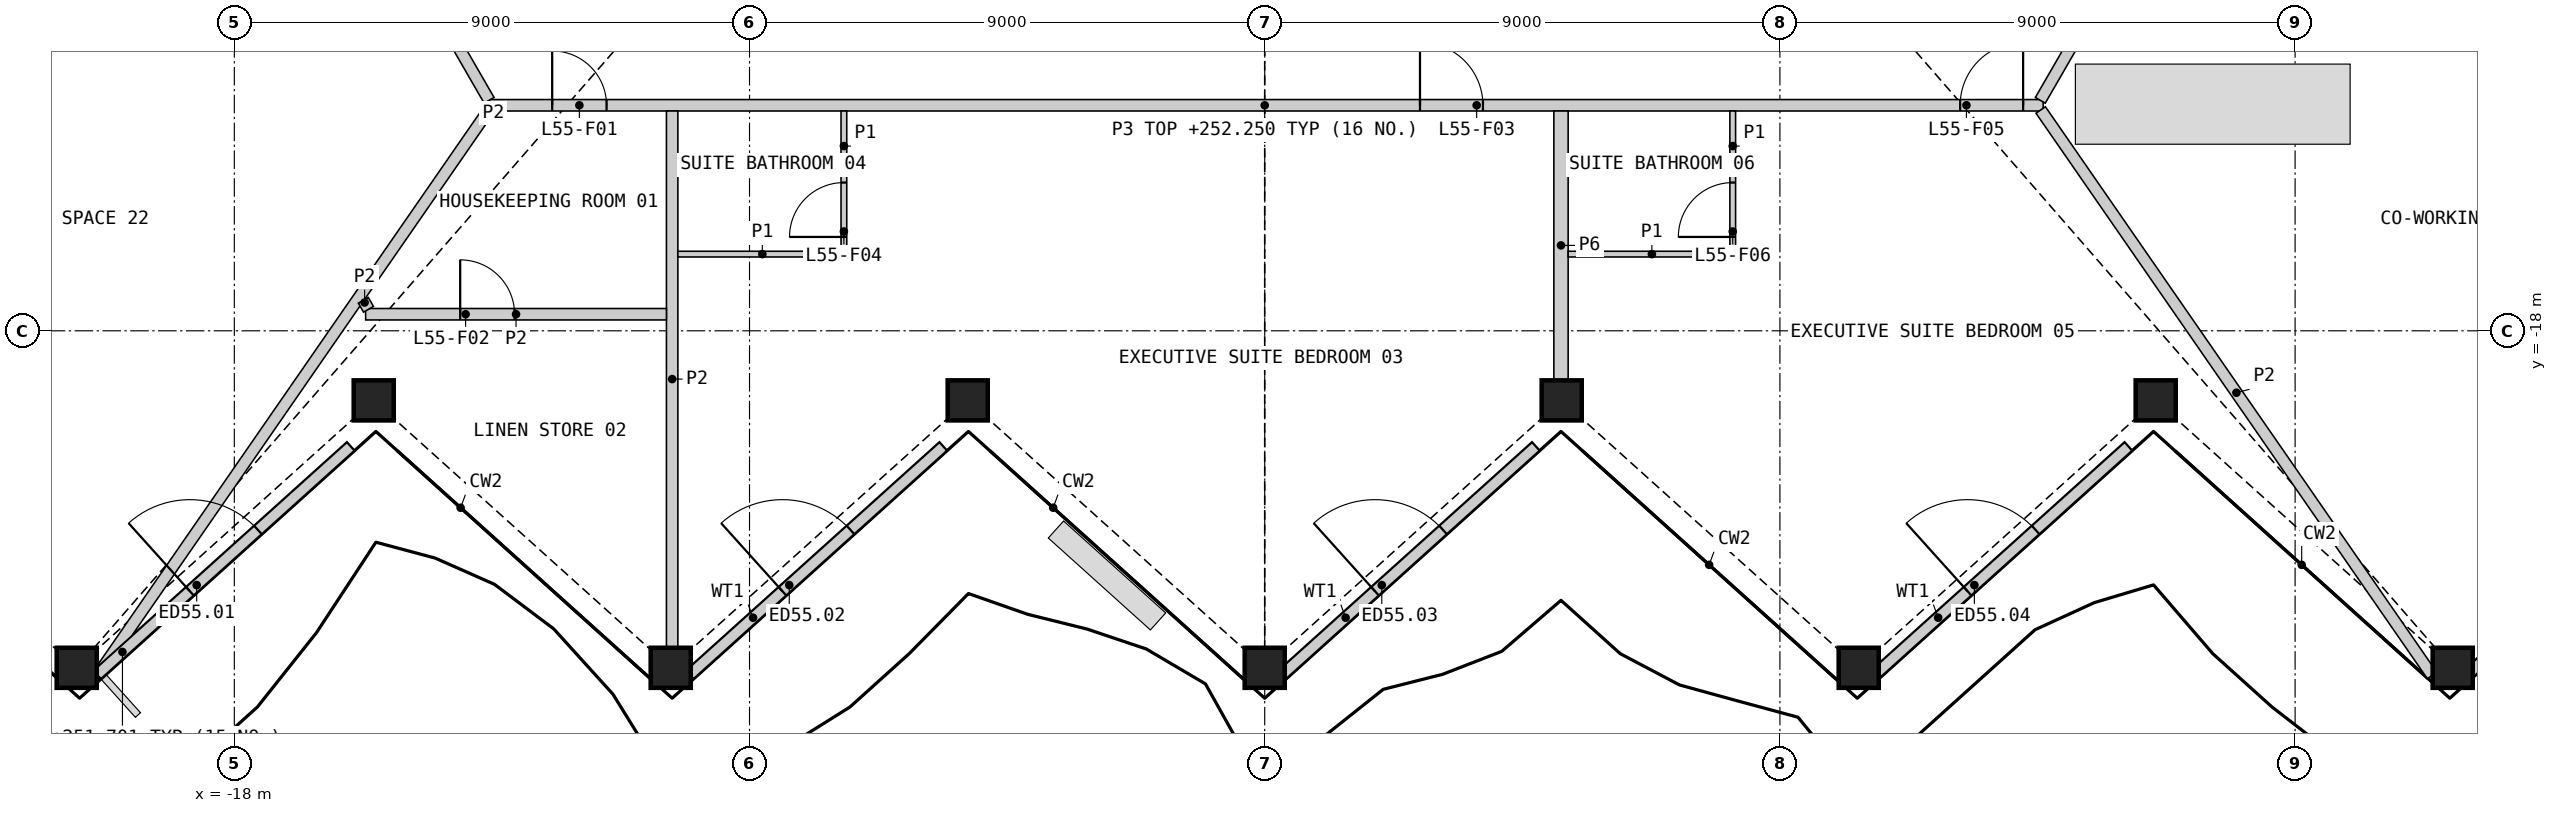
"""IFC4 building model, lengths in metres.
Left out: names, types, materials, properties, quantities, classifications, styles, units other than length and angle.
Written with IfcOpenShell. Run it as: python <this file> out.ifc"""

import sys

from ifc_helpers import new_model, si_unit, direction, frame, frame_2d, origin, origin_2d, place, context, subcontext, project, spatial, polyline, rectangle, hollow_rectangle, outline, extrude, element, fill, save


model = new_model("IFC4")
c1 = context("Model", 3, precision=1e-05, world=origin(), true_north=direction((0.0, 1.0)))
c2 = subcontext(c1, "Body", "Model", "MODEL_VIEW")
j1 = project(units=[si_unit("LENGTHUNIT", "METRE"), si_unit("PLANEANGLEUNIT", "RADIAN")], contexts=[c1])
p1 = place(None, origin())
s1 = spatial("IfcSite", under=j1, at=p1, CompositionType="ELEMENT")
p2 = place(p1, origin())
s2 = spatial("IfcBuilding", under=s1, at=p2, CompositionType="ELEMENT")
p3 = place(p2, frame((0.0, 0.0, 249.0)))
s3 = spatial("IfcBuildingStorey", under=s2, at=p3, CompositionType="ELEMENT", Elevation=249.0)
for number, where, z_axis, x_axis in (
    (1, (-20.753, -23.887, 0.0), (0.0, 0.0, 1.0), (1.0, 0.0, 0.0)),
    (2, (-15.565, -19.215, 0.0), (0.0, 0.0, 1.0), (1.0, 0.0, 0.0)),
    (3, (-10.376, -23.887, 0.0), (0.0, 0.0, 1.0), (1.0, 0.0, 0.0)),
    (4, (-5.188, -19.215, 0.0), (0.0, 0.0, 1.0), (1.0, 0.0, 0.0)),
    (5, (0.0, -23.887, 0.0), (0.0, 0.0, 1.0), (1.0, 0.0, 0.0)),
    (6, (5.188, -19.215, 0.0), (0.0, 0.0, 1.0), (1.0, 0.0, 0.0)),
    (7, (10.376, -23.887, 0.0), (0.0, 0.0, 1.0), (1.0, 0.0, 0.0)),
    (8, (15.565, -19.215, 0.0), (0.0, 0.0, 1.0), (1.0, 0.0, 0.0)),
    (9, (20.753, -23.887, 0.0), (0.0, 0.0, 1.0), (1.0, 0.0, 0.0)),
):
    element("IfcColumn", number, at=place(p3, frame(where, z_axis=z_axis, x_axis=x_axis)), inside=s3, PredefinedType="COLUMN", context=c2, shape_type="SweptSolid", body=[
        extrude(hollow_rectangle(XDim=0.7, YDim=0.7, WallThickness=0.045, at=origin_2d()), origin(), (0.0, 0.0, 1.0), 3.6),
    ])
p4 = place(p3, frame((-20.397, -24.009, 0.0), z_axis=(0.0, 0.0, 1.0), x_axis=(0.74315161366, 0.669123067241, 0.0)))
e10 = element("IfcWall", 10, at=p4, inside=s3, PredefinedType="SOLIDWALL", context=c2, shape_type="SweptSolid", body=[
    extrude(rectangle(XDim=5.963, YDim=0.2, at=frame_2d((2.981, 0.0))), origin(), (0.0, 0.0, 1.0), 2.701),
])
p5 = place(p4, frame((2.181, 0.0, 0.0)))
e11 = element("IfcOpeningElement", 11, at=p5, cuts=e10, PredefinedType="OPENING", context=c2, shape_type="SweptSolid", body=[
    extrude(rectangle(XDim=1.6, YDim=2.4, at=frame_2d((0.8, 1.2))), frame((0.0, 0.11, 0.0), z_axis=(0.0, -1.0, 0.0), x_axis=(1.0, 0.0, 0.0)), (0.0, 0.0, 1.0), 0.22),
])
p6 = place(p3, frame((-10.046, -24.009, 0.0), z_axis=(0.0, 0.0, 1.0), x_axis=(0.743133280699, 0.669143427912, 0.0)))
e12 = element("IfcWall", 12, at=p6, inside=s3, PredefinedType="SOLIDWALL", context=c2, shape_type="SweptSolid", body=[
    extrude(rectangle(XDim=5.962, YDim=0.2, at=frame_2d((2.981, 0.0))), origin(), (0.0, 0.0, 1.0), 2.701),
])
p7 = place(p6, frame((2.181, 0.0, 0.0)))
e13 = element("IfcOpeningElement", 13, at=p7, cuts=e12, PredefinedType="OPENING", context=c2, shape_type="SweptSolid", body=[
    extrude(rectangle(XDim=1.6, YDim=2.4, at=frame_2d((0.8, 1.2))), frame((0.0, 0.11, 0.0), z_axis=(0.0, -1.0, 0.0), x_axis=(1.0, 0.0, 0.0)), (0.0, 0.0, 1.0), 0.22),
])
p8 = place(p3, frame((0.305, -24.009, 0.0), z_axis=(0.0, 0.0, 1.0), x_axis=(0.74315161366, 0.669123067241, 0.0)))
e14 = element("IfcWall", 14, at=p8, inside=s3, PredefinedType="SOLIDWALL", context=c2, shape_type="SweptSolid", body=[
    extrude(rectangle(XDim=5.963, YDim=0.2, at=frame_2d((2.981, 0.0))), origin(), (0.0, 0.0, 1.0), 2.701),
])
p9 = place(p8, frame((2.181, 0.0, 0.0)))
e15 = element("IfcOpeningElement", 15, at=p9, cuts=e14, PredefinedType="OPENING", context=c2, shape_type="SweptSolid", body=[
    extrude(rectangle(XDim=1.6, YDim=2.4, at=frame_2d((0.8, 1.2))), frame((0.0, 0.11, 0.0), z_axis=(0.0, -1.0, 0.0), x_axis=(1.0, 0.0, 0.0)), (0.0, 0.0, 1.0), 0.22),
])
p10 = place(p3, frame((10.657, -24.009, 0.0), z_axis=(0.0, 0.0, 1.0), x_axis=(0.74315161366, 0.669123067241, 0.0)))
e16 = element("IfcWall", 16, at=p10, inside=s3, PredefinedType="SOLIDWALL", context=c2, shape_type="SweptSolid", body=[
    extrude(rectangle(XDim=5.963, YDim=0.2, at=frame_2d((2.981, 0.0))), origin(), (0.0, 0.0, 1.0), 2.701),
])
p11 = place(p10, frame((2.181, 0.0, 0.0)))
e17 = element("IfcOpeningElement", 17, at=p11, cuts=e16, PredefinedType="OPENING", context=c2, shape_type="SweptSolid", body=[
    extrude(rectangle(XDim=1.6, YDim=2.4, at=frame_2d((0.8, 1.2))), frame((0.0, 0.11, 0.0), z_axis=(0.0, -1.0, 0.0), x_axis=(1.0, 0.0, 0.0)), (0.0, 0.0, 1.0), 0.22),
])
p12 = place(p3, frame((21.008, -24.009, 0.0), z_axis=(0.0, 0.0, 1.0), x_axis=(0.743133280699, 0.669143427912, 0.0)))
e18 = element("IfcWall", 18, at=p12, inside=s3, PredefinedType="SOLIDWALL", context=c2, shape_type="SweptSolid", body=[
    extrude(rectangle(XDim=5.962, YDim=0.2, at=frame_2d((2.981, 0.0))), origin(), (0.0, 0.0, 1.0), 2.701),
])
p13 = place(p12, frame((2.181, 0.0, 0.0)))
e19 = element("IfcOpeningElement", 19, at=p13, cuts=e18, PredefinedType="OPENING", context=c2, shape_type="SweptSolid", body=[
    extrude(rectangle(XDim=1.6, YDim=2.4, at=frame_2d((0.8, 1.2))), frame((0.0, 0.11, 0.0), z_axis=(0.0, -1.0, 0.0), x_axis=(1.0, 0.0, 0.0)), (0.0, 0.0, 1.0), 0.22),
])
p14 = place(p3, frame((-13.599, -14.06, 0.0), z_axis=(0.0, 0.0, 1.0), x_axis=(1.0, 0.0, 0.0)))
e20 = element("IfcWall", 20, at=p14, inside=s3, PredefinedType="PARTITIONING", context=c2, shape_type="SweptSolid", body=[
    extrude(rectangle(XDim=27.198, YDim=0.2, at=frame_2d((13.599, 0.0))), origin(), (0.0, 0.0, 1.0), 3.25),
])
p15 = place(p14, frame((1.152, 0.0, 0.0)))
e21 = element("IfcOpeningElement", 21, at=p15, cuts=e20, PredefinedType="OPENING", context=c2, shape_type="SweptSolid", body=[
    extrude(rectangle(XDim=0.95, YDim=2.1, at=frame_2d((0.475, 1.05))), frame((0.0, 0.11, 0.0), z_axis=(0.0, -1.0, 0.0), x_axis=(1.0, 0.0, 0.0)), (0.0, 0.0, 1.0), 0.22),
])
p16 = place(p14, frame((16.311, 0.0, 0.0)))
e22 = element("IfcOpeningElement", 22, at=p16, cuts=e20, PredefinedType="OPENING", context=c2, shape_type="SweptSolid", body=[
    extrude(rectangle(XDim=1.1, YDim=2.1, at=frame_2d((0.55, 1.05))), frame((0.0, 0.11, 0.0), z_axis=(0.0, -1.0, 0.0), x_axis=(1.0, 0.0, 0.0)), (0.0, 0.0, 1.0), 0.22),
])
p17 = place(p14, frame((25.747, 0.0, 0.0)))
e23 = element("IfcOpeningElement", 23, at=p17, cuts=e20, PredefinedType="OPENING", context=c2, shape_type="SweptSolid", body=[
    extrude(rectangle(XDim=1.1, YDim=2.1, at=frame_2d((0.55, 1.05))), frame((0.0, 0.11, 0.0), z_axis=(0.0, -1.0, 0.0), x_axis=(1.0, 0.0, 0.0)), (0.0, 0.0, 1.0), 0.22),
])
p18 = place(p3, frame((5.176, -18.855, 0.0), z_axis=(0.0, 0.0, 1.0), x_axis=(0.0, 1.0, 0.0)))
e24 = element("IfcWall", 24, at=p18, inside=s3, PredefinedType="PARTITIONING", context=c2, shape_type="SweptSolid", body=[
    extrude(rectangle(XDim=4.695, YDim=0.25, at=frame_2d((2.348, 0.0))), origin(), (0.0, 0.0, 1.0), 2.404),
])
for number, where, z_axis, x_axis in (
    (25, (13.549, -13.974, 0.0), (0.0, 0.0, 1.0), (0.5, 0.866, 0.0)),
    (26, (-15.05, -11.374, 0.0), (0.0, 0.0, 1.0), (0.5, -0.866, 0.0)),
):
    element("IfcWall", number, at=place(p3, frame(where, z_axis=z_axis, x_axis=x_axis)), inside=s3, PredefinedType="PARTITIONING", context=c2, shape_type="SweptSolid", body=[
        extrude(rectangle(XDim=3.002, YDim=0.2, at=frame_2d((1.501, 0.0))), origin(), (0.0, 0.0, 1.0), 3.25),
    ])
p19 = place(p3, origin())
e27 = element("IfcWall", 27, at=p19, inside=s3, PredefinedType="PARTITIONING", context=c2, shape_type="SweptSolid", body=[
    extrude(outline(polyline([(-13.473, -14.199), (-19.794, -23.331), (-20.439, -23.912), (-13.638, -14.086), (-13.473, -14.199)])), origin(), (0.0, 0.0, 1.0), 2.404),
])
p20 = place(p3, frame((13.556, -14.143, 0.0), z_axis=(0.0, 0.0, 1.0), x_axis=(0.56913494803, -0.82224413098, 0.0)))
e28 = element("IfcWall", 28, at=p20, inside=s3, PredefinedType="PARTITIONING", context=c2, shape_type="SweptSolid", body=[
    extrude(rectangle(XDim=12.014, YDim=0.2, at=frame_2d((6.007, 0.0))), origin(), (0.0, 0.0, 1.0), 2.404),
])
p21 = place(p3, frame((-10.351, -23.527, 0.0), z_axis=(0.0, 0.0, 1.0), x_axis=(0.0, 1.0, 0.0)))
e29 = element("IfcWall", 29, at=p21, inside=s3, PredefinedType="PARTITIONING", context=c2, shape_type="SweptSolid", body=[
    extrude(rectangle(XDim=9.366, YDim=0.2, at=frame_2d((4.683, 0.0))), origin(), (0.0, 0.0, 1.0), 2.404),
])
p22 = place(p3, frame((-15.706, -17.71, 0.0), z_axis=(0.0, 0.0, 1.0), x_axis=(1.0, 0.0, 0.0)))
e30 = element("IfcWall", 30, at=p22, inside=s3, PredefinedType="PARTITIONING", context=c2, shape_type="SweptSolid", body=[
    extrude(rectangle(XDim=5.255, YDim=0.2, at=frame_2d((2.627, 0.0))), origin(), (0.0, 0.0, 1.0), 2.404),
])
p23 = place(p22, frame((1.652, 0.0, 0.0)))
e31 = element("IfcOpeningElement", 31, at=p23, cuts=e30, PredefinedType="OPENING", context=c2, shape_type="SweptSolid", body=[
    extrude(rectangle(XDim=0.95, YDim=2.1, at=frame_2d((0.475, 1.05))), frame((0.0, 0.11, 0.0), z_axis=(0.0, -1.0, 0.0), x_axis=(1.0, 0.0, 0.0)), (0.0, 0.0, 1.0), 0.22),
])
p24 = place(p3, frame((-15.747, -17.467, 0.0), z_axis=(0.0, 0.0, 1.0), x_axis=(0.498749683645, -0.866746071848, 0.0)))
e32 = element("IfcWall", 32, at=p24, inside=s3, PredefinedType="PARTITIONING", context=c2, shape_type="SweptSolid", body=[
    extrude(rectangle(XDim=0.181, YDim=0.2, at=frame_2d((0.091, 0.0))), origin(), (0.0, 0.0, 1.0), 2.404),
])
p25 = place(p3, frame((-10.251, -16.66, 0.0), z_axis=(0.0, 0.0, 1.0), x_axis=(1.0, 0.0, 0.0)))
e33 = element("IfcWall", 33, at=p25, inside=s3, PredefinedType="PARTITIONING", context=c2, shape_type="SweptSolid", body=[
    extrude(rectangle(XDim=2.95, YDim=0.1, at=frame_2d((1.475, 0.0))), origin(), (0.0, 0.0, 1.0), 2.404),
])
p26 = place(p3, frame((5.301, -16.66, 0.0), z_axis=(0.0, 0.0, 1.0), x_axis=(1.0, 0.0, 0.0)))
e34 = element("IfcWall", 34, at=p26, inside=s3, PredefinedType="PARTITIONING", context=c2, shape_type="SweptSolid", body=[
    extrude(rectangle(XDim=2.925, YDim=0.1, at=frame_2d((1.462, 0.0))), origin(), (0.0, 0.0, 1.0), 2.404),
])
p27 = place(p3, frame((-7.351, -16.61, 0.0), z_axis=(0.0, 0.0, 1.0), x_axis=(0.0, 1.0, 0.0)))
e35 = element("IfcWall", 35, at=p27, inside=s3, PredefinedType="PARTITIONING", context=c2, shape_type="SweptSolid", body=[
    extrude(rectangle(XDim=2.45, YDim=0.1, at=frame_2d((1.225, 0.0))), origin(), (0.0, 0.0, 1.0), 2.404),
])
p28 = place(p27, frame((0.25, 0.0, 0.0)))
e36 = element("IfcOpeningElement", 36, at=p28, cuts=e35, PredefinedType="OPENING", context=c2, shape_type="SweptSolid", body=[
    extrude(rectangle(XDim=0.95, YDim=2.1, at=frame_2d((0.475, 1.05))), frame((0.0, 0.06, 0.0), z_axis=(0.0, -1.0, 0.0), x_axis=(1.0, 0.0, 0.0)), (0.0, 0.0, 1.0), 0.12),
])
p29 = place(p3, frame((8.176, -16.61, 0.0), z_axis=(0.0, 0.0, 1.0), x_axis=(0.0, 1.0, 0.0)))
e37 = element("IfcWall", 37, at=p29, inside=s3, PredefinedType="PARTITIONING", context=c2, shape_type="SweptSolid", body=[
    extrude(rectangle(XDim=2.45, YDim=0.1, at=frame_2d((1.225, 0.0))), origin(), (0.0, 0.0, 1.0), 2.404),
])
p30 = place(p29, frame((0.25, 0.0, 0.0)))
e38 = element("IfcOpeningElement", 38, at=p30, cuts=e37, PredefinedType="OPENING", context=c2, shape_type="SweptSolid", body=[
    extrude(rectangle(XDim=0.95, YDim=2.1, at=frame_2d((0.475, 1.05))), frame((0.0, 0.06, 0.0), z_axis=(0.0, -1.0, 0.0), x_axis=(1.0, 0.0, 0.0)), (0.0, 0.0, 1.0), 0.12),
])
p31 = place(p5, origin())
e39 = element("IfcDoor", 39, at=p31, inside=s3, OperationType="DOUBLE_DOOR_SINGLE_SWING", PredefinedType="DOOR", context=c2, shape_type="SweptSolid", body=[
    extrude(rectangle(XDim=1.6, YDim=2.4, at=frame_2d((0.8, 1.2))), frame((0.0, 0.025, 0.0), z_axis=(0.0, -1.0, 0.0), x_axis=(1.0, 0.0, 0.0)), (0.0, 0.0, 1.0), 0.05),
])
fill(e11, e39)
p32 = place(p7, origin())
e40 = element("IfcDoor", 40, at=p32, inside=s3, OperationType="DOUBLE_DOOR_SINGLE_SWING", PredefinedType="DOOR", context=c2, shape_type="SweptSolid", body=[
    extrude(rectangle(XDim=1.6, YDim=2.4, at=frame_2d((0.8, 1.2))), frame((0.0, 0.025, 0.0), z_axis=(0.0, -1.0, 0.0), x_axis=(1.0, 0.0, 0.0)), (0.0, 0.0, 1.0), 0.05),
])
fill(e13, e40)
p33 = place(p9, origin())
e41 = element("IfcDoor", 41, at=p33, inside=s3, OperationType="DOUBLE_DOOR_SINGLE_SWING", PredefinedType="DOOR", context=c2, shape_type="SweptSolid", body=[
    extrude(rectangle(XDim=1.6, YDim=2.4, at=frame_2d((0.8, 1.2))), frame((0.0, 0.025, 0.0), z_axis=(0.0, -1.0, 0.0), x_axis=(1.0, 0.0, 0.0)), (0.0, 0.0, 1.0), 0.05),
])
fill(e15, e41)
p34 = place(p11, origin())
e42 = element("IfcDoor", 42, at=p34, inside=s3, OperationType="DOUBLE_DOOR_SINGLE_SWING", PredefinedType="DOOR", context=c2, shape_type="SweptSolid", body=[
    extrude(rectangle(XDim=1.6, YDim=2.4, at=frame_2d((0.8, 1.2))), frame((0.0, 0.025, 0.0), z_axis=(0.0, -1.0, 0.0), x_axis=(1.0, 0.0, 0.0)), (0.0, 0.0, 1.0), 0.05),
])
fill(e17, e42)
p35 = place(p15, origin())
e43 = element("IfcDoor", 43, at=p35, inside=s3, OperationType="SINGLE_SWING_LEFT", PredefinedType="DOOR", context=c2, shape_type="SweptSolid", body=[
    extrude(rectangle(XDim=0.95, YDim=2.1, at=frame_2d((0.475, 1.05))), frame((0.0, 0.025, 0.0), z_axis=(0.0, -1.0, 0.0), x_axis=(1.0, 0.0, 0.0)), (0.0, 0.0, 1.0), 0.05),
])
fill(e21, e43)
p36 = place(p23, origin())
e44 = element("IfcDoor", 44, at=p36, inside=s3, OperationType="SINGLE_SWING_LEFT", PredefinedType="DOOR", context=c2, shape_type="SweptSolid", body=[
    extrude(rectangle(XDim=0.95, YDim=2.1, at=frame_2d((0.475, 1.05))), frame((0.0, 0.025, 0.0), z_axis=(0.0, -1.0, 0.0), x_axis=(1.0, 0.0, 0.0)), (0.0, 0.0, 1.0), 0.05),
])
fill(e31, e44)
p37 = place(p16, origin())
e45 = element("IfcDoor", 45, at=p37, inside=s3, OperationType="SINGLE_SWING_LEFT", PredefinedType="DOOR", context=c2, shape_type="SweptSolid", body=[
    extrude(rectangle(XDim=1.1, YDim=2.1, at=frame_2d((0.55, 1.05))), frame((0.0, 0.025, 0.0), z_axis=(0.0, -1.0, 0.0), x_axis=(1.0, 0.0, 0.0)), (0.0, 0.0, 1.0), 0.05),
])
fill(e22, e45)
p38 = place(p28, origin())
e46 = element("IfcDoor", 46, at=p38, inside=s3, OperationType="SINGLE_SWING_LEFT", PredefinedType="DOOR", context=c2, shape_type="SweptSolid", body=[
    extrude(rectangle(XDim=0.95, YDim=2.1, at=frame_2d((0.475, 1.05))), frame((0.0, 0.025, 0.0), z_axis=(0.0, -1.0, 0.0), x_axis=(1.0, 0.0, 0.0)), (0.0, 0.0, 1.0), 0.05),
])
fill(e36, e46)
p39 = place(p17, origin())
e47 = element("IfcDoor", 47, at=p39, inside=s3, OperationType="SINGLE_SWING_RIGHT", PredefinedType="DOOR", context=c2, shape_type="SweptSolid", body=[
    extrude(rectangle(XDim=1.1, YDim=2.1, at=frame_2d((0.55, 1.05))), frame((0.0, 0.025, 0.0), z_axis=(0.0, -1.0, 0.0), x_axis=(1.0, 0.0, 0.0)), (0.0, 0.0, 1.0), 0.05),
])
fill(e23, e47)
p40 = place(p30, origin())
e48 = element("IfcDoor", 48, at=p40, inside=s3, OperationType="SINGLE_SWING_LEFT", PredefinedType="DOOR", context=c2, shape_type="SweptSolid", body=[
    extrude(rectangle(XDim=0.95, YDim=2.1, at=frame_2d((0.475, 1.05))), frame((0.0, 0.025, 0.0), z_axis=(0.0, -1.0, 0.0), x_axis=(1.0, 0.0, 0.0)), (0.0, 0.0, 1.0), 0.05),
])
fill(e38, e48)
save(model, sys.argv[1])
